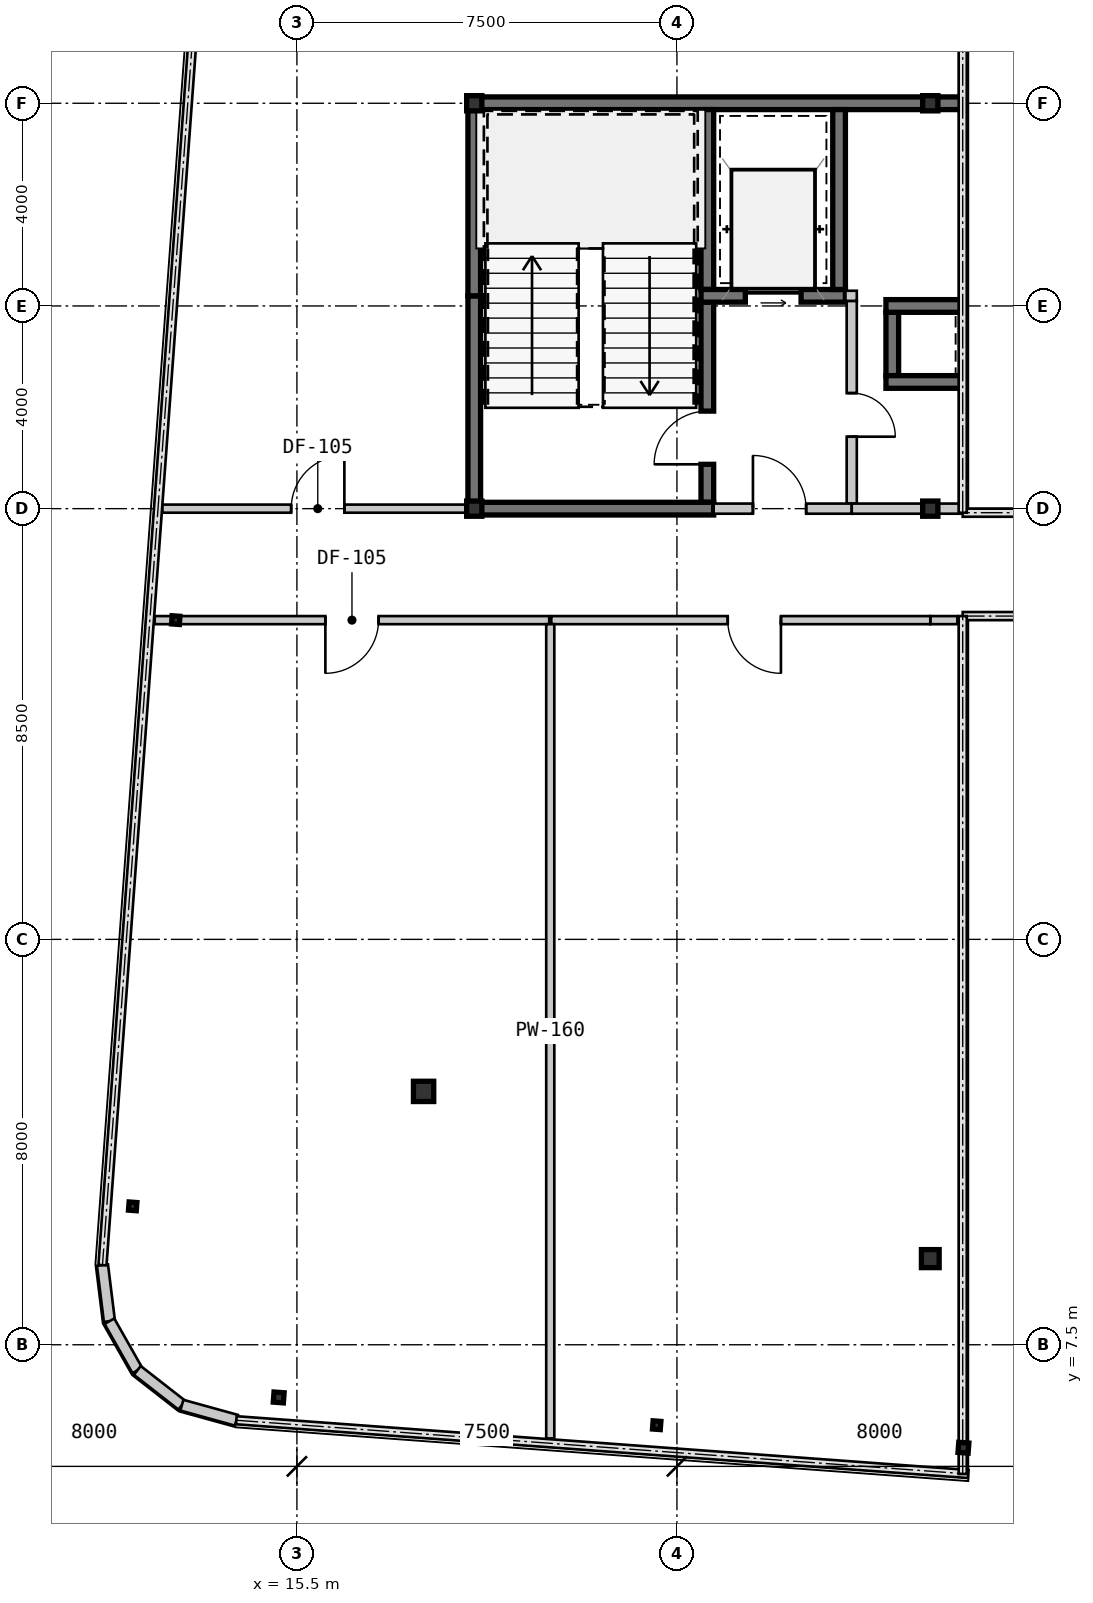
"""IFC4 building model, lengths in metres.
Left out: names, types, materials, properties, quantities, classifications, styles, units other than length and angle.
Written with IfcOpenShell. Run it as: python <this file> out.ifc"""

import sys

from ifc_helpers import new_model, si_unit, direction, frame, frame_2d, origin, origin_2d, place, context, subcontext, project, spatial, rectangle, hollow_rectangle, i_section, extrude, source, transform, mapped, element, fill, save


model = new_model("IFC4")
c1 = context("Model", 3, precision=1e-05, world=origin(), true_north=direction((0.0, 1.0)))
c2 = subcontext(c1, "Body", "Model", "MODEL_VIEW")
j1 = project(units=[si_unit("LENGTHUNIT", "METRE"), si_unit("PLANEANGLEUNIT", "RADIAN")], contexts=[c1])
p1 = place(None, origin())
s1 = spatial("IfcSite", under=j1, at=p1, CompositionType="ELEMENT")
p2 = place(p1, origin())
s2 = spatial("IfcBuilding", under=s1, at=p2, CompositionType="ELEMENT")
p3 = place(p2, frame((0.0, 0.0, 230.3)))
s3 = spatial("IfcBuildingStorey", under=s2, at=p3, CompositionType="ELEMENT", Elevation=230.3)
m1 = source(origin(), c2, "Body", "SweptSolid", [
    extrude(hollow_rectangle(XDim=0.3, YDim=0.3, WallThickness=0.012, at=origin_2d()), origin(), (0.0, 0.0, 1.0), 3.15),
])
for number, where, z_axis, x_axis in (
    (1, (19.0, 24.0, 0.0), (0.0, 0.0, 1.0), (1.0, 0.0, 0.0)),
    (2, (28.0, 24.0, 0.0), (0.0, 0.0, 1.0), (1.0, 0.0, 0.0)),
    (3, (19.0, 32.0, 0.0), (0.0, 0.0, 1.0), (1.0, 0.0, 0.0)),
    (4, (28.0, 32.0, 0.0), (0.0, 0.0, 1.0), (1.0, 0.0, 0.0)),
):
    element("IfcColumn", number, at=place(p3, frame(where, z_axis=z_axis, x_axis=x_axis)), inside=s3, PredefinedType="COLUMN", context=c2, shape_type="MappedRepresentation", body=[
        mapped(m1, transform((0.0, 0.0, 0.0), scale=1.0)),
    ])
m2 = source(origin(), c2, "Body", "SweptSolid", [
    extrude(i_section(OverallWidth=0.35, OverallDepth=0.356, WebThickness=0.018, FlangeThickness=0.028, at=origin_2d()), origin(), (0.0, 0.0, 1.0), 3.15),
])
p4 = place(p3, frame((28.0, 9.2, 0.0), z_axis=(0.0, 0.0, 1.0), x_axis=(1.0, 0.0, 0.0)))
e5 = element("IfcColumn", 5, at=p4, inside=s3, PredefinedType="COLUMN", context=c2, shape_type="MappedRepresentation", body=[
    mapped(m2, transform((0.0, 0.0, 0.0), scale=1.0)),
])
m3 = source(origin(), c2, "Body", "SweptSolid", [
    extrude(hollow_rectangle(XDim=0.4, YDim=0.4, WallThickness=0.016, at=origin_2d()), origin(), (0.0, 0.0, 1.0), 3.15),
])
p5 = place(p3, frame((18.0, 12.5, 0.0), z_axis=(0.0, 0.0, 1.0), x_axis=(1.0, 0.0, 0.0)))
e6 = element("IfcColumn", 6, at=p5, inside=s3, PredefinedType="COLUMN", context=c2, shape_type="MappedRepresentation", body=[
    mapped(m3, transform((0.0, 0.0, 0.0), scale=1.0)),
])
m4 = source(origin(), c2, "Body", "SweptSolid", [
    extrude(hollow_rectangle(XDim=0.2, YDim=0.2, WallThickness=0.009, at=origin_2d()), origin(), (0.0, 0.0, 1.0), 3.15),
])
p6 = place(p3, frame((15.141, 6.46, 0.0), z_axis=(0.0, 0.0, 1.0), x_axis=(0.997314477224, -0.073238197128, 0.0)))
e7 = element("IfcColumn", 7, at=p6, inside=s3, PredefinedType="COLUMN", context=c2, shape_type="MappedRepresentation", body=[
    mapped(m4, transform((0.0, 0.0, 0.0), scale=1.0)),
])
m5 = source(origin(), c2, "Body", "SweptSolid", [
    extrude(i_section(OverallWidth=0.154, OverallDepth=0.162, WebThickness=0.008, FlangeThickness=0.011, at=origin_2d()), origin(), (0.0, 0.0, 1.0), 3.15),
])
for number, where, z_axis, x_axis in (
    (8, (22.601, 5.912, 0.0), (0.0, 0.0, 1.0), (0.997, -0.073, 0.0)),
    (9, (12.259, 10.231, 0.0), (0.0, 0.0, 1.0), (0.997, -0.073, 0.0)),
    (10, (13.109, 21.8, 0.0), (0.0, 0.0, 1.0), (0.997, -0.073, 0.0)),
):
    element("IfcColumn", number, at=place(p3, frame(where, z_axis=z_axis, x_axis=x_axis)), inside=s3, PredefinedType="COLUMN", context=c2, shape_type="MappedRepresentation", body=[
        mapped(m5, transform((0.0, 0.0, 0.0), scale=1.0)),
    ])
p7 = place(p3, frame((28.654, 5.468, 0.0), z_axis=(0.0, 0.0, 1.0), x_axis=(0.997314477224, -0.073238197128, 0.0)))
e11 = element("IfcColumn", 11, at=p7, inside=s3, PredefinedType="COLUMN", context=c2, shape_type="MappedRepresentation", body=[
    mapped(m4, transform((0.0, 0.0, 0.0), scale=1.0)),
])
m6 = source(origin(), c2, "Body", "SweptSolid", [
    extrude(rectangle(XDim=1.116, YDim=0.22, at=frame_2d((0.558, 0.0))), origin(), (0.0, 0.0, 1.0), 2.93),
])
for number, where, z_axis, x_axis in (
    (12, (11.663, 9.072, 0.0), (0.0, 0.0, 1.0), (0.123, -0.992, 0.0)),
    (13, (11.8, 7.965, 0.0), (0.0, 0.0, 1.0), (0.493, -0.87, 0.0)),
    (14, (12.35, 6.994, 0.0), (0.0, 0.0, 1.0), (0.789, -0.615, 0.0)),
):
    element("IfcWall", number, at=place(p3, frame(where, z_axis=z_axis, x_axis=x_axis)), inside=s3, PredefinedType="SOLIDWALL", context=c2, shape_type="MappedRepresentation", body=[
        mapped(m6, transform((0.0, 0.0, 0.0), scale=1.0)),
    ])
m7 = source(origin(), c2, "Body", "SweptSolid", [
    extrude(rectangle(XDim=1.116, YDim=0.22, at=frame_2d((0.558, 0.0))), origin(), (0.0, 0.0, 1.0), 2.93),
])
p8 = place(p3, frame((13.23, 6.307, 0.0), z_axis=(0.0, 0.0, 1.0), x_axis=(0.963890028874, -0.266300605026, 0.0)))
e15 = element("IfcWall", 15, at=p8, inside=s3, PredefinedType="SOLIDWALL", context=c2, shape_type="MappedRepresentation", body=[
    mapped(m7, transform((0.0, 0.0, 0.0), scale=1.0)),
])
m8 = source(origin(), c2, "Body", "SweptSolid", [
    extrude(rectangle(XDim=9.125, YDim=0.25, at=frame_2d((4.562, 0.0))), origin(), (0.0, 0.0, 1.0), 2.93),
])
p9 = place(p3, frame((18.875, 32.0, 0.0), z_axis=(0.0, 0.0, 1.0), x_axis=(1.0, 0.0, 0.0)))
e16 = element("IfcWall", 16, at=p9, inside=s3, PredefinedType="SHEAR", context=c2, shape_type="MappedRepresentation", body=[
    mapped(m8, transform((0.0, 0.0, 0.0), scale=1.0)),
])
m9 = source(origin(), c2, "Body", "SweptSolid", [
    extrude(rectangle(XDim=0.64, YDim=0.25, at=frame_2d((0.32, 0.0))), origin(), (0.0, 0.0, 1.0), 2.93),
])
p10 = place(p3, frame((28.0, 32.0, 0.0), z_axis=(0.0, 0.0, 1.0), x_axis=(1.0, 0.0, 0.0)))
e17 = element("IfcWall", 17, at=p10, inside=s3, PredefinedType="SHEAR", context=c2, shape_type="MappedRepresentation", body=[
    mapped(m9, transform((0.0, 0.0, 0.0), scale=1.0)),
])
m10 = source(origin(), c2, "Body", "SweptSolid", [
    extrude(rectangle(XDim=4.075, YDim=0.25, at=frame_2d((2.038, 0.0))), origin(), (0.0, 0.0, 1.0), 2.93),
])
p11 = place(p3, frame((19.0, 24.125, 0.0), z_axis=(0.0, 0.0, 1.0), x_axis=(0.0, 1.0, 0.0)))
e18 = element("IfcWall", 18, at=p11, inside=s3, PredefinedType="SHEAR", context=c2, shape_type="MappedRepresentation", body=[
    mapped(m10, transform((0.0, 0.0, 0.0), scale=1.0)),
])
m11 = source(origin(), c2, "Body", "SweptSolid", [
    extrude(rectangle(XDim=3.675, YDim=0.25, at=frame_2d((1.837, 0.0))), origin(), (0.0, 0.0, 1.0), 2.93),
])
p12 = place(p3, frame((19.0, 28.2, 0.0), z_axis=(0.0, 0.0, 1.0), x_axis=(0.0, 1.0, 0.0)))
e19 = element("IfcWall", 19, at=p12, inside=s3, PredefinedType="SHEAR", context=c2, shape_type="MappedRepresentation", body=[
    mapped(m11, transform((0.0, 0.0, 0.0), scale=1.0)),
])
m12 = source(origin(), c2, "Body", "SweptSolid", [
    extrude(rectangle(XDim=3.55, YDim=0.25, at=frame_2d((1.775, 0.0))), origin(), (0.0, 0.0, 1.0), 2.93),
])
p13 = place(p3, frame((23.6, 28.325, 0.0), z_axis=(0.0, 0.0, 1.0), x_axis=(0.0, 1.0, 0.0)))
e20 = element("IfcWall", 20, at=p13, inside=s3, PredefinedType="SHEAR", context=c2, shape_type="MappedRepresentation", body=[
    mapped(m12, transform((0.0, 0.0, 0.0), scale=1.0)),
])
m13 = source(origin(), c2, "Body", "SweptSolid", [
    extrude(rectangle(XDim=3.95, YDim=0.25, at=frame_2d((1.975, 0.0))), origin(), (0.0, 0.0, 1.0), 2.93),
])
p14 = place(p3, frame((23.6, 24.125, 0.0), z_axis=(0.0, 0.0, 1.0), x_axis=(0.0, 1.0, 0.0)))
e21 = element("IfcWall", 21, at=p14, inside=s3, PredefinedType="SHEAR", context=c2, shape_type="MappedRepresentation", body=[
    mapped(m13, transform((0.0, 0.0, 0.0), scale=1.0)),
])
m14 = source(origin(), c2, "Body", "SweptSolid", [
    extrude(rectangle(XDim=1.05, YDim=2.1, at=frame_2d((0.525, 1.05))), frame((0.0, 0.135, 0.0), z_axis=(0.0, -1.0, 0.0), x_axis=(1.0, 0.0, 0.0)), (0.0, 0.0, 1.0), 0.27),
])
p15 = place(p14, frame((0.75, 0.0, 0.0)))
e22 = element("IfcOpeningElement", 22, at=p15, cuts=e21, PredefinedType="OPENING", context=c2, shape_type="MappedRepresentation", body=[
    mapped(m14, transform((0.0, 0.0, 0.0), scale=1.0)),
])
m15 = source(origin(), c2, "Body", "SweptSolid", [
    extrude(rectangle(XDim=4.85, YDim=0.25, at=frame_2d((2.425, 0.0))), origin(), (0.0, 0.0, 1.0), 2.93),
])
p16 = place(p3, frame((18.875, 24.0, 0.0), z_axis=(0.0, 0.0, 1.0), x_axis=(1.0, 0.0, 0.0)))
e23 = element("IfcWall", 23, at=p16, inside=s3, PredefinedType="SHEAR", context=c2, shape_type="MappedRepresentation", body=[
    mapped(m15, transform((0.0, 0.0, 0.0), scale=1.0)),
])
m16 = source(origin(), c2, "Body", "SweptSolid", [
    extrude(rectangle(XDim=2.85, YDim=0.25, at=frame_2d((1.425, 0.0))), origin(), (0.0, 0.0, 1.0), 2.93),
])
p17 = place(p3, frame((23.475, 28.2, 0.0), z_axis=(0.0, 0.0, 1.0), x_axis=(1.0, 0.0, 0.0)))
e24 = element("IfcWall", 24, at=p17, inside=s3, PredefinedType="SHEAR", context=c2, shape_type="MappedRepresentation", body=[
    mapped(m16, transform((0.0, 0.0, 0.0), scale=1.0)),
])
m17 = source(origin(), c2, "Body", "SweptSolid", [
    extrude(rectangle(XDim=1.1, YDim=2.15, at=frame_2d((0.55, 1.075))), frame((0.0, 0.135, 0.0), z_axis=(0.0, -1.0, 0.0), x_axis=(1.0, 0.0, 0.0)), (0.0, 0.0, 1.0), 0.27),
])
p18 = place(p17, frame((0.875, 0.0, 0.0)))
e25 = element("IfcOpeningElement", 25, at=p18, cuts=e24, PredefinedType="OPENING", context=c2, shape_type="MappedRepresentation", body=[
    mapped(m17, transform((0.0, 0.0, 0.0), scale=1.0)),
])
p19 = place(p3, frame((26.2, 28.325, 0.0), z_axis=(0.0, 0.0, 1.0), x_axis=(0.0, 1.0, 0.0)))
e26 = element("IfcWall", 26, at=p19, inside=s3, PredefinedType="SHEAR", context=c2, shape_type="MappedRepresentation", body=[
    mapped(m12, transform((0.0, 0.0, 0.0), scale=1.0)),
])
m18 = source(origin(), c2, "Body", "SweptSolid", [
    extrude(rectangle(XDim=4.0, YDim=0.2, at=frame_2d((2.0, 0.0))), origin(), (0.0, 0.0, 1.0), 2.93),
])
p20 = place(p3, frame((26.45, 24.1, 0.0), z_axis=(0.0, 0.0, 1.0), x_axis=(0.0, 1.0, 0.0)))
e27 = element("IfcWall", 27, at=p20, inside=s3, PredefinedType="SOLIDWALL", context=c2, shape_type="MappedRepresentation", body=[
    mapped(m18, transform((0.0, 0.0, 0.0), scale=1.0)),
])
m19 = source(origin(), c2, "Body", "SweptSolid", [
    extrude(rectangle(XDim=0.86, YDim=2.1, at=frame_2d((0.43, 1.05))), frame((0.0, 0.11, 0.0), z_axis=(0.0, -1.0, 0.0), x_axis=(1.0, 0.0, 0.0)), (0.0, 0.0, 1.0), 0.22),
])
p21 = place(p20, frame((1.32, 0.0, 0.0)))
e28 = element("IfcOpeningElement", 28, at=p21, cuts=e27, PredefinedType="OPENING", context=c2, shape_type="MappedRepresentation", body=[
    mapped(m19, transform((0.0, 0.0, 0.0), scale=1.0)),
])
m20 = source(origin(), c2, "Body", "SweptSolid", [
    extrude(rectangle(XDim=2.725, YDim=0.2, at=frame_2d((1.362, 0.0))), origin(), (0.0, 0.0, 1.0), 2.47),
])
p22 = place(p3, frame((23.725, 24.0, 0.0), z_axis=(0.0, 0.0, 1.0), x_axis=(1.0, 0.0, 0.0)))
e29 = element("IfcWall", 29, at=p22, inside=s3, PredefinedType="SOLIDWALL", context=c2, shape_type="MappedRepresentation", body=[
    mapped(m20, transform((0.0, 0.0, 0.0), scale=1.0)),
])
m21 = source(origin(), c2, "Body", "SweptSolid", [
    extrude(rectangle(XDim=1.05, YDim=2.1, at=frame_2d((0.525, 1.05))), frame((0.0, 0.11, 0.0), z_axis=(0.0, -1.0, 0.0), x_axis=(1.0, 0.0, 0.0)), (0.0, 0.0, 1.0), 0.22),
])
p23 = place(p22, frame((0.775, 0.0, 0.0)))
e30 = element("IfcOpeningElement", 30, at=p23, cuts=e29, PredefinedType="OPENING", context=c2, shape_type="MappedRepresentation", body=[
    mapped(m21, transform((0.0, 0.0, 0.0), scale=1.0)),
])
m22 = source(origin(), c2, "Body", "SweptSolid", [
    extrude(rectangle(XDim=1.25, YDim=0.25, at=frame_2d((0.625, 0.0))), origin(), (0.0, 0.0, 1.0), 2.93),
])
p24 = place(p3, frame((27.25, 27.875, 0.0), z_axis=(0.0, 0.0, 1.0), x_axis=(0.0, -1.0, 0.0)))
e31 = element("IfcWall", 31, at=p24, inside=s3, PredefinedType="SHEAR", context=c2, shape_type="MappedRepresentation", body=[
    mapped(m22, transform((0.0, 0.0, 0.0), scale=1.0)),
])
m23 = source(origin(), c2, "Body", "SweptSolid", [
    extrude(rectangle(XDim=1.515, YDim=0.25, at=frame_2d((0.757, 0.0))), origin(), (0.0, 0.0, 1.0), 2.93),
])
for number, where, z_axis, x_axis in (
    (32, (28.64, 28.0, 0.0), (0.0, 0.0, 1.0), (-1.0, 0.0, 0.0)),
    (33, (27.125, 26.5, 0.0), (0.0, 0.0, 1.0), (1.0, 0.0, 0.0)),
):
    element("IfcWall", number, at=place(p3, frame(where, z_axis=z_axis, x_axis=x_axis)), inside=s3, PredefinedType="SHEAR", context=c2, shape_type="MappedRepresentation", body=[
        mapped(m23, transform((0.0, 0.0, 0.0), scale=1.0)),
    ])
m24 = source(origin(), c2, "Body", "SweptSolid", [
    extrude(rectangle(XDim=0.594, YDim=0.2, at=frame_2d((0.297, 0.0))), origin(), (0.0, 0.0, 1.0), 2.23),
])
p25 = place(p3, frame((28.594, 24.0, 0.0), z_axis=(0.0, 0.0, 1.0), x_axis=(-1.0, 0.0, 0.0)))
e34 = element("IfcWall", 34, at=p25, inside=s3, PredefinedType="SOLIDWALL", context=c2, shape_type="MappedRepresentation", body=[
    mapped(m24, transform((0.0, 0.0, 0.0), scale=1.0)),
])
m25 = source(origin(), c2, "Body", "SweptSolid", [
    extrude(rectangle(XDim=1.55, YDim=0.2, at=frame_2d((0.775, 0.0))), origin(), (0.0, 0.0, 1.0), 2.47),
])
p26 = place(p3, frame((28.0, 24.0, 0.0), z_axis=(0.0, 0.0, 1.0), x_axis=(-1.0, 0.0, 0.0)))
e35 = element("IfcWall", 35, at=p26, inside=s3, PredefinedType="SOLIDWALL", context=c2, shape_type="MappedRepresentation", body=[
    mapped(m25, transform((0.0, 0.0, 0.0), scale=1.0)),
])
m26 = source(origin(), c2, "Body", "SweptSolid", [
    extrude(rectangle(XDim=6.032, YDim=0.16, at=frame_2d((3.016, 0.0))), origin(), (0.0, 0.0, 1.0), 2.93),
])
p27 = place(p3, frame((12.843, 24.0, 0.0), z_axis=(0.0, 0.0, 1.0), x_axis=(1.0, 0.0, 0.0)))
e36 = element("IfcWall", 36, at=p27, inside=s3, PredefinedType="PARTITIONING", context=c2, shape_type="MappedRepresentation", body=[
    mapped(m26, transform((0.0, 0.0, 0.0), scale=1.0)),
])
m27 = source(origin(), c2, "Body", "SweptSolid", [
    extrude(rectangle(XDim=1.05, YDim=2.1, at=frame_2d((0.525, 1.05))), frame((0.0, 0.09, 0.0), z_axis=(0.0, -1.0, 0.0), x_axis=(1.0, 0.0, 0.0)), (0.0, 0.0, 1.0), 0.18),
])
p28 = place(p27, frame((2.543, 0.0, 0.0)))
e37 = element("IfcOpeningElement", 37, at=p28, cuts=e36, PredefinedType="OPENING", context=c2, shape_type="MappedRepresentation", body=[
    mapped(m27, transform((0.0, 0.0, 0.0), scale=1.0)),
])
m28 = source(origin(), c2, "Body", "SweptSolid", [
    extrude(rectangle(XDim=7.786, YDim=0.16, at=frame_2d((3.893, 0.0))), origin(), (0.0, 0.0, 1.0), 2.93),
])
p29 = place(p3, frame((20.48, 21.8, 0.0), z_axis=(0.0, 0.0, 1.0), x_axis=(-1.0, 0.0, 0.0)))
e38 = element("IfcWall", 38, at=p29, inside=s3, PredefinedType="PARTITIONING", context=c2, shape_type="MappedRepresentation", body=[
    mapped(m28, transform((0.0, 0.0, 0.0), scale=1.0)),
])
p30 = place(p29, frame((3.368, 0.0, 0.0)))
e39 = element("IfcOpeningElement", 39, at=p30, cuts=e38, PredefinedType="OPENING", context=c2, shape_type="MappedRepresentation", body=[
    mapped(m27, transform((0.0, 0.0, 0.0), scale=1.0)),
])
m29 = source(origin(), c2, "Body", "SweptSolid", [
    extrude(rectangle(XDim=0.534, YDim=0.16, at=frame_2d((0.267, 0.0))), origin(), (0.0, 0.0, 1.0), 2.23),
])
p31 = place(p3, frame((28.534, 21.8, 0.0), z_axis=(0.0, 0.0, 1.0), x_axis=(-1.0, 0.0, 0.0)))
e40 = element("IfcWall", 40, at=p31, inside=s3, PredefinedType="PARTITIONING", context=c2, shape_type="MappedRepresentation", body=[
    mapped(m29, transform((0.0, 0.0, 0.0), scale=1.0)),
])
m30 = source(origin(), c2, "Body", "SweptSolid", [
    extrude(rectangle(XDim=7.48, YDim=0.16, at=frame_2d((3.74, 0.0))), origin(), (0.0, 0.0, 1.0), 2.93),
])
p32 = place(p3, frame((28.0, 21.8, 0.0), z_axis=(0.0, 0.0, 1.0), x_axis=(-1.0, 0.0, 0.0)))
e41 = element("IfcWall", 41, at=p32, inside=s3, PredefinedType="PARTITIONING", context=c2, shape_type="MappedRepresentation", body=[
    mapped(m30, transform((0.0, 0.0, 0.0), scale=1.0)),
])
p33 = place(p32, frame((2.948, 0.0, 0.0)))
e42 = element("IfcOpeningElement", 42, at=p33, cuts=e41, PredefinedType="OPENING", context=c2, shape_type="MappedRepresentation", body=[
    mapped(m27, transform((0.0, 0.0, 0.0), scale=1.0)),
])
m31 = source(origin(), c2, "Body", "SweptSolid", [
    extrude(rectangle(XDim=16.069, YDim=0.16, at=frame_2d((8.034, 0.0))), origin(), (0.0, 0.0, 1.0), 2.93),
])
p34 = place(p3, frame((20.5, 21.72, 0.0), z_axis=(0.0, 0.0, 1.0), x_axis=(0.0, -1.0, 0.0)))
e43 = element("IfcWall", 43, at=p34, inside=s3, PredefinedType="PARTITIONING", context=c2, shape_type="MappedRepresentation", body=[
    mapped(m31, transform((0.0, 0.0, 0.0), scale=1.0)),
])
m32 = source(origin(), c2, "Body", "SweptSolid", [
    extrude(rectangle(XDim=0.225, YDim=0.2, at=frame_2d((0.113, 0.0))), origin(), (0.0, 0.0, 1.0), 2.93),
])
p35 = place(p3, frame((26.325, 28.2, 0.0), z_axis=(0.0, 0.0, 1.0), x_axis=(1.0, 0.0, 0.0)))
e44 = element("IfcWall", 44, at=p35, inside=s3, PredefinedType="SOLIDWALL", context=c2, shape_type="MappedRepresentation", body=[
    mapped(m32, transform((0.0, 0.0, 0.0), scale=1.0)),
])
m33 = source(origin(), c2, "Body", "SweptSolid", [
    extrude(rectangle(XDim=1.05, YDim=2.1, at=frame_2d((0.525, 1.05))), frame((0.0, 0.025, 0.0), z_axis=(0.0, -1.0, 0.0), x_axis=(1.0, 0.0, 0.0)), (0.0, 0.0, 1.0), 0.05),
])
p36 = place(p15, origin())
e45 = element("IfcDoor", 45, at=p36, inside=s3, OperationType="SINGLE_SWING_LEFT", PredefinedType="DOOR", context=c2, shape_type="MappedRepresentation", body=[
    mapped(m33, transform((0.0, 0.0, 0.0), scale=1.0)),
])
fill(e22, e45)
m34 = source(origin(), c2, "Body", "SweptSolid", [
    extrude(rectangle(XDim=1.1, YDim=2.15, at=frame_2d((0.55, 1.075))), frame((0.0, 0.025, 0.0), z_axis=(0.0, -1.0, 0.0), x_axis=(1.0, 0.0, 0.0)), (0.0, 0.0, 1.0), 0.05),
])
p37 = place(p18, origin())
e46 = element("IfcDoor", 46, at=p37, inside=s3, OperationType="SLIDING_TO_LEFT", PredefinedType="DOOR", context=c2, shape_type="MappedRepresentation", body=[
    mapped(m34, transform((0.0, 0.0, 0.0), scale=1.0)),
])
fill(e25, e46)
p38 = place(p23, origin())
e47 = element("IfcDoor", 47, at=p38, inside=s3, OperationType="SINGLE_SWING_LEFT", PredefinedType="DOOR", context=c2, shape_type="MappedRepresentation", body=[
    mapped(m33, transform((0.0, 0.0, 0.0), scale=1.0)),
])
fill(e30, e47)
p39 = place(p28, origin())
e48 = element("IfcDoor", 48, at=p39, inside=s3, OperationType="SINGLE_SWING_RIGHT", PredefinedType="DOOR", context=c2, shape_type="MappedRepresentation", body=[
    mapped(m33, transform((0.0, 0.0, 0.0), scale=1.0)),
])
fill(e37, e48)
p40 = place(p30, origin())
e49 = element("IfcDoor", 49, at=p40, inside=s3, OperationType="SINGLE_SWING_RIGHT", PredefinedType="DOOR", context=c2, shape_type="MappedRepresentation", body=[
    mapped(m33, transform((0.0, 0.0, 0.0), scale=1.0)),
])
fill(e39, e49)
p41 = place(p33, origin())
e50 = element("IfcDoor", 50, at=p41, inside=s3, OperationType="SINGLE_SWING_LEFT", PredefinedType="DOOR", context=c2, shape_type="MappedRepresentation", body=[
    mapped(m33, transform((0.0, 0.0, 0.0), scale=1.0)),
])
fill(e42, e50)
m35 = source(origin(), c2, "Body", "SweptSolid", [
    extrude(rectangle(XDim=0.86, YDim=2.1, at=frame_2d((0.43, 1.05))), frame((0.0, 0.025, 0.0), z_axis=(0.0, -1.0, 0.0), x_axis=(1.0, 0.0, 0.0)), (0.0, 0.0, 1.0), 0.05),
])
p42 = place(p21, frame((0.86, 0.0, 0.0), z_axis=(0.0, 0.0, 1.0), x_axis=(-1.0, 0.0, 0.0)))
e51 = element("IfcDoor", 51, at=p42, inside=s3, OperationType="SINGLE_SWING_RIGHT", PredefinedType="DOOR", context=c2, shape_type="MappedRepresentation", body=[
    mapped(m35, transform((0.0, 0.0, 0.0), scale=1.0)),
])
fill(e28, e51)
save(model, sys.argv[1])
